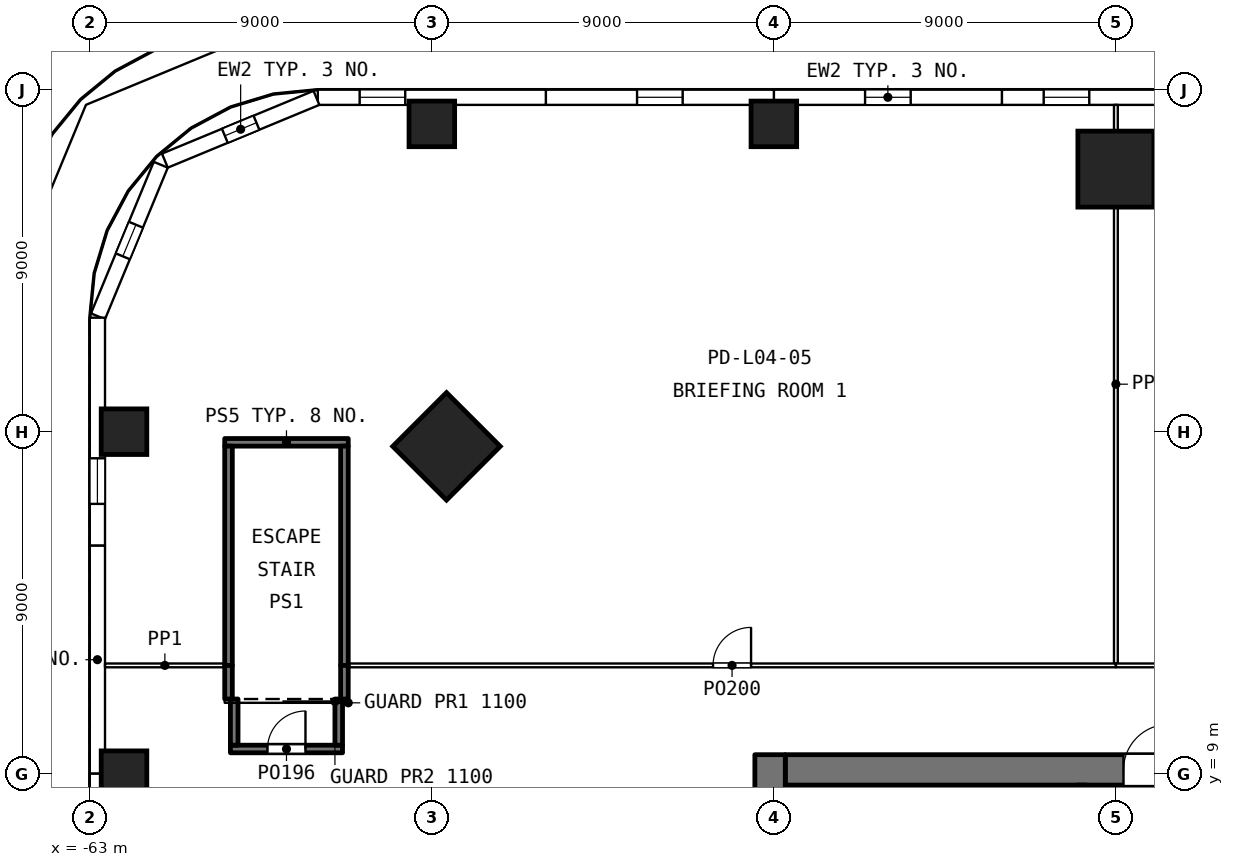
"""IFC4 building model, lengths in metres.
Left out: names, types, materials, properties, quantities, classifications, styles, units other than length and angle.
Written with IfcOpenShell. Run it as: python <this file> out.ifc"""

import sys

from ifc_helpers import new_model, si_unit, direction, frame, frame_2d, origin, origin_2d, place, context, subcontext, project, spatial, rectangle, extrude, element, fill, save


model = new_model("IFC4")
c1 = context("Model", 3, precision=1e-05, world=origin(), true_north=direction((0.0, 1.0)))
c2 = subcontext(c1, "Body", "Model", "MODEL_VIEW")
j1 = project(units=[si_unit("LENGTHUNIT", "METRE"), si_unit("PLANEANGLEUNIT", "RADIAN")], contexts=[c1])
p1 = place(None, origin())
s1 = spatial("IfcSite", under=j1, at=p1, CompositionType="ELEMENT")
p2 = place(p1, origin())
s2 = spatial("IfcBuilding", under=s1, at=p2, CompositionType="ELEMENT")
p3 = place(p2, frame((0.0, 0.0, 22.8)))
s3 = spatial("IfcBuildingStorey", under=s2, at=p3, CompositionType="ELEMENT", Elevation=22.8)
for number, where, z_axis, x_axis in (
    (1, (-62.1, 9.0, 0.0), (0.0, 0.0, 1.0), (1.0, 0.0, 0.0)),
    (2, (-62.1, 18.0, 0.0), (0.0, 0.0, 1.0), (1.0, 0.0, 0.0)),
    (3, (-54.0, 26.1, 0.0), (0.0, 0.0, 1.0), (1.0, 0.0, 0.0)),
    (4, (-45.0, 26.1, 0.0), (0.0, 0.0, 1.0), (1.0, 0.0, 0.0)),
):
    element("IfcColumn", number, at=place(p3, frame(where, z_axis=z_axis, x_axis=x_axis)), inside=s3, PredefinedType="COLUMN", context=c2, shape_type="SweptSolid", body=[
        extrude(rectangle(XDim=1.2, YDim=1.2, at=origin_2d()), origin(), (0.0, 0.0, 1.0), 4.8),
    ])
for number, where, z_axis, x_axis in (
    (5, (-36.0, 24.91, 0.0), (0.0, 0.0, 1.0), (0.0, 1.0, 0.0)),
    (6, (-53.614, 17.614, 0.0), (0.0, 0.0, 1.0), (-0.707, 0.707, 0.0)),
):
    element("IfcColumn", number, at=place(p3, frame(where, z_axis=z_axis, x_axis=x_axis)), inside=s3, PredefinedType="COLUMN", context=c2, shape_type="SweptSolid", body=[
        extrude(rectangle(XDim=2.0, YDim=2.0, at=origin_2d()), origin(), (0.0, 0.0, 1.0), 4.8),
    ])
p4 = place(p3, frame((-33.0, 26.8, 0.0), z_axis=(0.0, 0.0, 1.0), x_axis=(-1.0, 0.0, 0.0)))
e7 = element("IfcWall", 7, at=p4, inside=s3, PredefinedType="SOLIDWALL", context=c2, shape_type="SweptSolid", body=[
    extrude(rectangle(XDim=6.0, YDim=0.4, at=frame_2d((3.0, 0.0))), origin(), (0.0, 0.0, 1.0), 4.5),
])
p5 = place(p4, frame((3.7, 0.0, 1.1)))
e8 = element("IfcOpeningElement", 8, at=p5, cuts=e7, PredefinedType="OPENING", context=c2, shape_type="SweptSolid", body=[
    extrude(rectangle(XDim=1.2, YDim=1.8, at=frame_2d((0.6, 0.9))), frame((0.0, 0.21, 0.0), z_axis=(0.0, -1.0, 0.0), x_axis=(1.0, 0.0, 0.0)), (0.0, 0.0, 1.0), 0.42),
])
p6 = place(p3, frame((-39.0, 26.8, 0.0), z_axis=(0.0, 0.0, 1.0), x_axis=(-1.0, 0.0, 0.0)))
e9 = element("IfcWall", 9, at=p6, inside=s3, PredefinedType="SOLIDWALL", context=c2, shape_type="SweptSolid", body=[
    extrude(rectangle(XDim=6.0, YDim=0.4, at=frame_2d((3.0, 0.0))), origin(), (0.0, 0.0, 1.0), 4.5),
])
p7 = place(p6, frame((2.4, 0.0, 1.1)))
e10 = element("IfcOpeningElement", 10, at=p7, cuts=e9, PredefinedType="OPENING", context=c2, shape_type="SweptSolid", body=[
    extrude(rectangle(XDim=1.2, YDim=1.8, at=frame_2d((0.6, 0.9))), frame((0.0, 0.21, 0.0), z_axis=(0.0, -1.0, 0.0), x_axis=(1.0, 0.0, 0.0)), (0.0, 0.0, 1.0), 0.42),
])
p8 = place(p3, frame((-45.0, 26.8, 0.0), z_axis=(0.0, 0.0, 1.0), x_axis=(-1.0, 0.0, 0.0)))
e11 = element("IfcWall", 11, at=p8, inside=s3, PredefinedType="SOLIDWALL", context=c2, shape_type="SweptSolid", body=[
    extrude(rectangle(XDim=6.0, YDim=0.4, at=frame_2d((3.0, 0.0))), origin(), (0.0, 0.0, 1.0), 4.5),
])
p9 = place(p8, frame((2.4, 0.0, 1.1)))
e12 = element("IfcOpeningElement", 12, at=p9, cuts=e11, PredefinedType="OPENING", context=c2, shape_type="SweptSolid", body=[
    extrude(rectangle(XDim=1.2, YDim=1.8, at=frame_2d((0.6, 0.9))), frame((0.0, 0.21, 0.0), z_axis=(0.0, -1.0, 0.0), x_axis=(1.0, 0.0, 0.0)), (0.0, 0.0, 1.0), 0.42),
])
p10 = place(p3, frame((-51.0, 26.8, 0.0), z_axis=(0.0, 0.0, 1.0), x_axis=(-1.0, 0.0, 0.0)))
e13 = element("IfcWall", 13, at=p10, inside=s3, PredefinedType="SOLIDWALL", context=c2, shape_type="SweptSolid", body=[
    extrude(rectangle(XDim=6.0, YDim=0.4, at=frame_2d((3.0, 0.0))), origin(), (0.0, 0.0, 1.0), 4.5),
])
p11 = place(p10, frame((3.7, 0.0, 1.1)))
e14 = element("IfcOpeningElement", 14, at=p11, cuts=e13, PredefinedType="OPENING", context=c2, shape_type="SweptSolid", body=[
    extrude(rectangle(XDim=1.2, YDim=1.8, at=frame_2d((0.6, 0.9))), frame((0.0, 0.21, 0.0), z_axis=(0.0, -1.0, 0.0), x_axis=(1.0, 0.0, 0.0)), (0.0, 0.0, 1.0), 0.42),
])
p12 = place(p3, frame((-57.037, 26.785, 0.0), z_axis=(0.0, 0.0, 1.0), x_axis=(-0.923854820772, -0.382743086333, 0.0)))
e15 = element("IfcWall", 15, at=p12, inside=s3, PredefinedType="SOLIDWALL", context=c2, shape_type="SweptSolid", body=[
    extrude(rectangle(XDim=4.316, YDim=0.4, at=frame_2d((2.158, 0.0))), origin(), (0.0, 0.0, 1.0), 4.5),
])
p13 = place(p12, frame((1.708, 0.0, 1.0)))
e16 = element("IfcOpeningElement", 16, at=p13, cuts=e15, PredefinedType="OPENING", context=c2, shape_type="SweptSolid", body=[
    extrude(rectangle(XDim=0.9, YDim=2.4, at=frame_2d((0.45, 1.2))), frame((0.0, 0.21, 0.0), z_axis=(0.0, -1.0, 0.0), x_axis=(1.0, 0.0, 0.0)), (0.0, 0.0, 1.0), 0.42),
])
p14 = place(p3, frame((-61.133, 25.025, 0.0), z_axis=(0.0, 0.0, 1.0), x_axis=(-0.382743086333, -0.923854820772, 0.0)))
e17 = element("IfcWall", 17, at=p14, inside=s3, PredefinedType="SOLIDWALL", context=c2, shape_type="SweptSolid", body=[
    extrude(rectangle(XDim=4.316, YDim=0.4, at=frame_2d((2.158, 0.0))), origin(), (0.0, 0.0, 1.0), 4.5),
])
p15 = place(p14, frame((1.708, 0.0, 1.0)))
e18 = element("IfcOpeningElement", 18, at=p15, cuts=e17, PredefinedType="OPENING", context=c2, shape_type="SweptSolid", body=[
    extrude(rectangle(XDim=0.9, YDim=2.4, at=frame_2d((0.45, 1.2))), frame((0.0, 0.21, 0.0), z_axis=(0.0, -1.0, 0.0), x_axis=(1.0, 0.0, 0.0)), (0.0, 0.0, 1.0), 0.42),
])
p16 = place(p3, frame((-62.8, 21.0, 0.0), z_axis=(0.0, 0.0, 1.0), x_axis=(0.0, -1.0, 0.0)))
e19 = element("IfcWall", 19, at=p16, inside=s3, PredefinedType="SOLIDWALL", context=c2, shape_type="SweptSolid", body=[
    extrude(rectangle(XDim=6.0, YDim=0.4, at=frame_2d((3.0, 0.0))), origin(), (0.0, 0.0, 1.0), 4.5),
])
p17 = place(p16, frame((3.7, 0.0, 1.1)))
e20 = element("IfcOpeningElement", 20, at=p17, cuts=e19, PredefinedType="OPENING", context=c2, shape_type="SweptSolid", body=[
    extrude(rectangle(XDim=1.2, YDim=1.8, at=frame_2d((0.6, 0.9))), frame((0.0, 0.21, 0.0), z_axis=(0.0, -1.0, 0.0), x_axis=(1.0, 0.0, 0.0)), (0.0, 0.0, 1.0), 0.42),
])
p18 = place(p3, frame((-62.8, 15.0, 0.0), z_axis=(0.0, 0.0, 1.0), x_axis=(0.0, -1.0, 0.0)))
e21 = element("IfcWall", 21, at=p18, inside=s3, PredefinedType="SOLIDWALL", context=c2, shape_type="SweptSolid", body=[
    extrude(rectangle(XDim=6.0, YDim=0.4, at=frame_2d((3.0, 0.0))), origin(), (0.0, 0.0, 1.0), 4.5),
])
p19 = place(p3, frame((-62.8, 9.0, 0.0), z_axis=(0.0, 0.0, 1.0), x_axis=(0.0, -1.0, 0.0)))
e22 = element("IfcWall", 22, at=p19, inside=s3, PredefinedType="SOLIDWALL", context=c2, shape_type="SweptSolid", body=[
    extrude(rectangle(XDim=6.0, YDim=0.4, at=frame_2d((3.0, 0.0))), origin(), (0.0, 0.0, 1.0), 4.5),
])
p20 = place(p19, frame((2.1, 0.0, 0.0)))
e23 = element("IfcOpeningElement", 23, at=p20, cuts=e22, PredefinedType="OPENING", context=c2, shape_type="SweptSolid", body=[
    extrude(rectangle(XDim=1.8, YDim=2.4, at=frame_2d((0.9, 1.2))), frame((0.0, 0.21, 0.0), z_axis=(0.0, -1.0, 0.0), x_axis=(1.0, 0.0, 0.0)), (0.0, 0.0, 1.0), 0.42),
])
p21 = place(p3, frame((-44.7, 9.1, 0.0), z_axis=(0.0, 0.0, 1.0), x_axis=(1.0, 0.0, 0.0)))
e24 = element("IfcWall", 24, at=p21, inside=s3, PredefinedType="SHEAR", context=c2, shape_type="SweptSolid", body=[
    extrude(rectangle(XDim=17.4, YDim=0.8, at=frame_2d((8.7, 0.0))), origin(), (0.0, 0.0, 1.0), 4.5),
])
p22 = place(p21, frame((8.9, 0.0, 0.0)))
e25 = element("IfcOpeningElement", 25, at=p22, cuts=e24, PredefinedType="OPENING", context=c2, shape_type="SweptSolid", body=[
    extrude(rectangle(XDim=1.2, YDim=2.1, at=frame_2d((0.6, 1.05))), frame((0.0, 0.41, 0.0), z_axis=(0.0, -1.0, 0.0), x_axis=(1.0, 0.0, 0.0)), (0.0, 0.0, 1.0), 0.82),
])
p23 = place(p21, frame((14.6, 0.0, 0.0)))
e26 = element("IfcOpeningElement", 26, at=p23, cuts=e24, PredefinedType="OPENING", context=c2, shape_type="SweptSolid", body=[
    extrude(rectangle(XDim=0.9, YDim=2.1, at=frame_2d((0.45, 1.05))), frame((0.0, 0.41, 0.0), z_axis=(0.0, -1.0, 0.0), x_axis=(1.0, 0.0, 0.0)), (0.0, 0.0, 1.0), 0.82),
])
p24 = place(p21, frame((16.1, 0.0, 0.0)))
e27 = element("IfcOpeningElement", 27, at=p24, cuts=e24, PredefinedType="OPENING", context=c2, shape_type="SweptSolid", body=[
    extrude(rectangle(XDim=0.9, YDim=2.1, at=frame_2d((0.45, 1.05))), frame((0.0, 0.41, 0.0), z_axis=(0.0, -1.0, 0.0), x_axis=(1.0, 0.0, 0.0)), (0.0, 0.0, 1.0), 0.82),
])
p25 = place(p3, frame((-45.1, -9.5, 0.0), z_axis=(0.0, 0.0, 1.0), x_axis=(0.0, 1.0, 0.0)))
e28 = element("IfcWall", 28, at=p25, inside=s3, PredefinedType="SHEAR", context=c2, shape_type="SweptSolid", body=[
    extrude(rectangle(XDim=19.0, YDim=0.8, at=frame_2d((9.5, 0.0))), origin(), (0.0, 0.0, 1.0), 4.5),
])
p26 = place(p25, frame((8.3, 0.0, 0.0)))
e29 = element("IfcOpeningElement", 29, at=p26, cuts=e28, PredefinedType="OPENING", context=c2, shape_type="SweptSolid", body=[
    extrude(rectangle(XDim=2.4, YDim=2.1, at=frame_2d((1.2, 1.05))), frame((0.0, 0.41, 0.0), z_axis=(0.0, -1.0, 0.0), x_axis=(1.0, 0.0, 0.0)), (0.0, 0.0, 1.0), 0.82),
])
p27 = place(p3, frame((-36.9, 4.875, 0.0), z_axis=(0.0, 0.0, 1.0), x_axis=(0.0, 1.0, 0.0)))
e30 = element("IfcWall", 30, at=p27, inside=s3, PredefinedType="SHEAR", context=c2, shape_type="SweptSolid", body=[
    extrude(rectangle(XDim=3.825, YDim=0.25, at=frame_2d((1.913, 0.0))), origin(), (0.0, 0.0, 1.0), 4.5),
])
p28 = place(p27, frame((1.325, 0.0, 0.0)))
e31 = element("IfcOpeningElement", 31, at=p28, cuts=e30, PredefinedType="OPENING", context=c2, shape_type="SweptSolid", body=[
    extrude(rectangle(XDim=1.2, YDim=2.1, at=frame_2d((0.6, 1.05))), frame((0.0, 0.135, 0.0), z_axis=(0.0, -1.0, 0.0), x_axis=(1.0, 0.0, 0.0)), (0.0, 0.0, 1.0), 0.27),
])
p29 = place(p3, frame((-59.45, 17.72, 0.0), z_axis=(0.0, 0.0, 1.0), x_axis=(1.0, 0.0, 0.0)))
e32 = element("IfcWall", 32, at=p29, inside=s3, PredefinedType="SOLIDWALL", context=c2, shape_type="SweptSolid", body=[
    extrude(rectangle(XDim=3.25, YDim=0.2, at=frame_2d((1.625, 0.0))), origin(), (0.0, 0.0, 1.0), 4.5),
])
for number, where, z_axis, x_axis in (
    (33, (-59.35, 11.85, 0.0), (0.0, 0.0, 1.0), (0.0, 1.0, 0.0)),
    (34, (-56.3, 11.85, 0.0), (0.0, 0.0, 1.0), (0.0, 1.0, 0.0)),
):
    element("IfcWall", number, at=place(p3, frame(where, z_axis=z_axis, x_axis=x_axis)), inside=s3, PredefinedType="SOLIDWALL", context=c2, shape_type="SweptSolid", body=[
        extrude(rectangle(XDim=5.77, YDim=0.2, at=frame_2d((2.885, 0.0))), origin(), (0.0, 0.0, 1.0), 4.5),
    ])
p30 = place(p3, frame((-59.3, 9.65, 0.0), z_axis=(0.0, 0.0, 1.0), x_axis=(1.0, 0.0, 0.0)))
e35 = element("IfcWall", 35, at=p30, inside=s3, PredefinedType="SOLIDWALL", context=c2, shape_type="SweptSolid", body=[
    extrude(rectangle(XDim=2.95, YDim=0.2, at=frame_2d((1.475, 0.0))), origin(), (0.0, 0.0, 1.0), 4.5),
])
p31 = place(p30, frame((0.975, 0.0, 0.0)))
e36 = element("IfcOpeningElement", 36, at=p31, cuts=e35, PredefinedType="OPENING", context=c2, shape_type="SweptSolid", body=[
    extrude(rectangle(XDim=1.0, YDim=2.1, at=frame_2d((0.5, 1.05))), frame((0.0, 0.11, 0.0), z_axis=(0.0, -1.0, 0.0), x_axis=(1.0, 0.0, 0.0)), (0.0, 0.0, 1.0), 0.22),
])
p32 = place(p3, frame((-59.35, 10.965, 0.0), z_axis=(0.0, 0.0, 1.0), x_axis=(0.0, 1.0, 0.0)))
e37 = element("IfcWall", 37, at=p32, inside=s3, PredefinedType="SOLIDWALL", context=c2, shape_type="SweptSolid", body=[
    extrude(rectangle(XDim=0.885, YDim=0.2, at=frame_2d((0.442, 0.0))), origin(), (0.0, 0.0, 1.0), 4.5),
])
for number, where, z_axis, x_axis in (
    (38, (-59.2, 9.75, 0.0), (0.0, 0.0, 1.0), (0.0, 1.0, 0.0)),
    (39, (-56.45, 9.75, 0.0), (0.0, 0.0, 1.0), (0.0, 1.0, 0.0)),
):
    element("IfcWall", number, at=place(p3, frame(where, z_axis=z_axis, x_axis=x_axis)), inside=s3, PredefinedType="SOLIDWALL", context=c2, shape_type="SweptSolid", body=[
        extrude(rectangle(XDim=1.215, YDim=0.2, at=frame_2d((0.607, 0.0))), origin(), (0.0, 0.0, 1.0), 4.5),
    ])
p33 = place(p3, frame((-56.3, 10.965, 0.0), z_axis=(0.0, 0.0, 1.0), x_axis=(0.0, 1.0, 0.0)))
e40 = element("IfcWall", 40, at=p33, inside=s3, PredefinedType="SOLIDWALL", context=c2, shape_type="SweptSolid", body=[
    extrude(rectangle(XDim=0.885, YDim=0.2, at=frame_2d((0.442, 0.0))), origin(), (0.0, 0.0, 1.0), 4.5),
])
p34 = place(p3, frame((-36.0, 11.9, 0.0), z_axis=(0.0, 0.0, 1.0), x_axis=(0.0, 1.0, 0.0)))
e41 = element("IfcWall", 41, at=p34, inside=s3, PredefinedType="PARTITIONING", context=c2, shape_type="SweptSolid", body=[
    extrude(rectangle(XDim=14.7, YDim=0.1, at=frame_2d((7.35, 0.0))), origin(), (0.0, 0.0, 1.0), 3.71),
])
p35 = place(p3, frame((-62.6, 11.85, 0.0), z_axis=(0.0, 0.0, 1.0), x_axis=(1.0, 0.0, 0.0)))
e42 = element("IfcWall", 42, at=p35, inside=s3, PredefinedType="PARTITIONING", context=c2, shape_type="SweptSolid", body=[
    extrude(rectangle(XDim=3.15, YDim=0.1, at=frame_2d((1.575, 0.0))), origin(), (0.0, 0.0, 1.0), 4.5),
])
p36 = place(p3, frame((-56.2, 11.85, 0.0), z_axis=(0.0, 0.0, 1.0), x_axis=(1.0, 0.0, 0.0)))
e43 = element("IfcWall", 43, at=p36, inside=s3, PredefinedType="PARTITIONING", context=c2, shape_type="SweptSolid", body=[
    extrude(rectangle(XDim=20.2, YDim=0.1, at=frame_2d((10.1, 0.0))), origin(), (0.0, 0.0, 1.0), 4.5),
])
p37 = place(p36, frame((9.6, 0.0, 0.0)))
e44 = element("IfcOpeningElement", 44, at=p37, cuts=e43, PredefinedType="OPENING", context=c2, shape_type="SweptSolid", body=[
    extrude(rectangle(XDim=1.0, YDim=2.1, at=frame_2d((0.5, 1.05))), frame((0.0, 0.06, 0.0), z_axis=(0.0, -1.0, 0.0), x_axis=(1.0, 0.0, 0.0)), (0.0, 0.0, 1.0), 0.12),
])
p38 = place(p3, frame((-36.0, 11.85, 0.0), z_axis=(0.0, 0.0, 1.0), x_axis=(1.0, 0.0, 0.0)))
e45 = element("IfcWall", 45, at=p38, inside=s3, PredefinedType="PARTITIONING", context=c2, shape_type="SweptSolid", body=[
    extrude(rectangle(XDim=23.0, YDim=0.1, at=frame_2d((11.5, 0.0))), origin(), (0.0, 0.0, 1.0), 4.5),
])
p39 = place(p5, origin())
e46 = element("IfcWindow", 46, at=p39, inside=s3, PartitioningType="SINGLE_PANEL", PredefinedType="WINDOW", context=c2, shape_type="SweptSolid", body=[
    extrude(rectangle(XDim=1.2, YDim=1.8, at=frame_2d((0.6, 0.9))), frame((0.0, 0.03, 0.0), z_axis=(0.0, -1.0, 0.0), x_axis=(1.0, 0.0, 0.0)), (0.0, 0.0, 1.0), 0.06),
])
fill(e8, e46)
p40 = place(p7, origin())
e47 = element("IfcWindow", 47, at=p40, inside=s3, PartitioningType="SINGLE_PANEL", PredefinedType="WINDOW", context=c2, shape_type="SweptSolid", body=[
    extrude(rectangle(XDim=1.2, YDim=1.8, at=frame_2d((0.6, 0.9))), frame((0.0, 0.03, 0.0), z_axis=(0.0, -1.0, 0.0), x_axis=(1.0, 0.0, 0.0)), (0.0, 0.0, 1.0), 0.06),
])
fill(e10, e47)
p41 = place(p9, origin())
e48 = element("IfcWindow", 48, at=p41, inside=s3, PartitioningType="SINGLE_PANEL", PredefinedType="WINDOW", context=c2, shape_type="SweptSolid", body=[
    extrude(rectangle(XDim=1.2, YDim=1.8, at=frame_2d((0.6, 0.9))), frame((0.0, 0.03, 0.0), z_axis=(0.0, -1.0, 0.0), x_axis=(1.0, 0.0, 0.0)), (0.0, 0.0, 1.0), 0.06),
])
fill(e12, e48)
p42 = place(p11, origin())
e49 = element("IfcWindow", 49, at=p42, inside=s3, PartitioningType="SINGLE_PANEL", PredefinedType="WINDOW", context=c2, shape_type="SweptSolid", body=[
    extrude(rectangle(XDim=1.2, YDim=1.8, at=frame_2d((0.6, 0.9))), frame((0.0, 0.03, 0.0), z_axis=(0.0, -1.0, 0.0), x_axis=(1.0, 0.0, 0.0)), (0.0, 0.0, 1.0), 0.06),
])
fill(e14, e49)
p43 = place(p13, origin())
e50 = element("IfcWindow", 50, at=p43, inside=s3, PartitioningType="SINGLE_PANEL", PredefinedType="WINDOW", context=c2, shape_type="SweptSolid", body=[
    extrude(rectangle(XDim=0.9, YDim=2.4, at=frame_2d((0.45, 1.2))), frame((0.0, 0.03, 0.0), z_axis=(0.0, -1.0, 0.0), x_axis=(1.0, 0.0, 0.0)), (0.0, 0.0, 1.0), 0.06),
])
fill(e16, e50)
p44 = place(p15, origin())
e51 = element("IfcWindow", 51, at=p44, inside=s3, PartitioningType="SINGLE_PANEL", PredefinedType="WINDOW", context=c2, shape_type="SweptSolid", body=[
    extrude(rectangle(XDim=0.9, YDim=2.4, at=frame_2d((0.45, 1.2))), frame((0.0, 0.03, 0.0), z_axis=(0.0, -1.0, 0.0), x_axis=(1.0, 0.0, 0.0)), (0.0, 0.0, 1.0), 0.06),
])
fill(e18, e51)
p45 = place(p17, origin())
e52 = element("IfcWindow", 52, at=p45, inside=s3, PartitioningType="SINGLE_PANEL", PredefinedType="WINDOW", context=c2, shape_type="SweptSolid", body=[
    extrude(rectangle(XDim=1.2, YDim=1.8, at=frame_2d((0.6, 0.9))), frame((0.0, 0.03, 0.0), z_axis=(0.0, -1.0, 0.0), x_axis=(1.0, 0.0, 0.0)), (0.0, 0.0, 1.0), 0.06),
])
fill(e20, e52)
p46 = place(p22, origin())
e53 = element("IfcDoor", 53, at=p46, inside=s3, OperationType="SINGLE_SWING_RIGHT", PredefinedType="DOOR", context=c2, shape_type="SweptSolid", body=[
    extrude(rectangle(XDim=1.2, YDim=2.1, at=frame_2d((0.6, 1.05))), frame((0.0, -0.225, 0.0), z_axis=(0.0, -1.0, 0.0), x_axis=(1.0, 0.0, 0.0)), (0.0, 0.0, 1.0), 0.05),
])
fill(e25, e53)
p47 = place(p31, origin())
e54 = element("IfcDoor", 54, at=p47, inside=s3, OperationType="SINGLE_SWING_RIGHT", PredefinedType="DOOR", context=c2, shape_type="SweptSolid", body=[
    extrude(rectangle(XDim=1.0, YDim=2.1, at=frame_2d((0.5, 1.05))), frame((0.0, 0.025, 0.0), z_axis=(0.0, -1.0, 0.0), x_axis=(1.0, 0.0, 0.0)), (0.0, 0.0, 1.0), 0.05),
])
fill(e36, e54)
p48 = place(p37, origin())
e55 = element("IfcDoor", 55, at=p48, inside=s3, OperationType="SINGLE_SWING_RIGHT", PredefinedType="DOOR", context=c2, shape_type="SweptSolid", body=[
    extrude(rectangle(XDim=1.0, YDim=2.1, at=frame_2d((0.5, 1.05))), frame((0.0, 0.025, 0.0), z_axis=(0.0, -1.0, 0.0), x_axis=(1.0, 0.0, 0.0)), (0.0, 0.0, 1.0), 0.05),
])
fill(e44, e55)
save(model, sys.argv[1])
